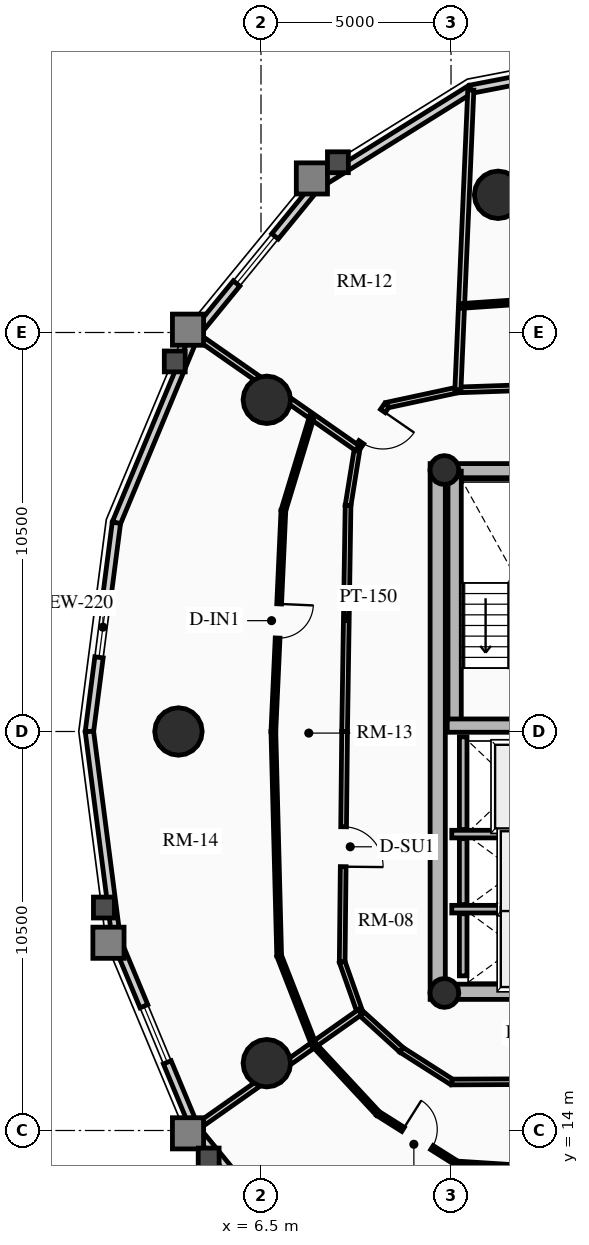
"""IFC4 building model, lengths in metres.
Left out: names, types, materials, properties, quantities, classifications, styles, units other than length and angle.
Written with IfcOpenShell. Run it as: python <this file> out.ifc"""

import sys

from ifc_helpers import new_model, si_unit, direction, frame, frame_2d, origin, origin_2d, place, context, subcontext, project, spatial, rectangle, circle, hollow_circle, extrude, source, transform, mapped, element, fill, save


model = new_model("IFC4")
c1 = context("Model", 3, precision=1e-05, world=origin(), true_north=direction((0.0, 1.0)))
c2 = subcontext(c1, "Body", "Model", "MODEL_VIEW")
j1 = project(units=[si_unit("LENGTHUNIT", "METRE"), si_unit("PLANEANGLEUNIT", "RADIAN")], contexts=[c1])
p1 = place(None, origin())
s1 = spatial("IfcSite", under=j1, at=p1, CompositionType="ELEMENT")
p2 = place(p1, origin())
s2 = spatial("IfcBuilding", under=s1, at=p2, CompositionType="ELEMENT")
p3 = place(p2, frame((0.0, 0.0, 160.33)))
s3 = spatial("IfcBuildingStorey", under=s2, at=p3, CompositionType="ELEMENT", Elevation=160.33)
p4 = place(p3, frame((11.15, 17.45, 0.0), z_axis=(0.0, 0.0, 1.0), x_axis=(0.0, 1.0, 0.0)))
e1 = element("IfcWall", 1, at=p4, inside=s3, PredefinedType="SHEAR", context=c2, shape_type="SweptSolid", body=[
    extrude(rectangle(XDim=14.1, YDim=0.4, at=frame_2d((7.05, 0.0))), origin(), (0.0, 0.0, 1.0), 2.91),
])
p5 = place(p3, frame((11.15, 17.65, 0.0), z_axis=(0.0, 0.0, 1.0), x_axis=(1.0, 0.0, 0.0)))
e2 = element("IfcWall", 2, at=p5, inside=s3, PredefinedType="SHEAR", context=c2, shape_type="SweptSolid", body=[
    extrude(rectangle(XDim=10.7, YDim=0.4, at=frame_2d((5.35, 0.0))), origin(), (0.0, 0.0, 1.0), 2.91),
])
m1 = source(origin(), c2, "Body", "SweptSolid", [
    extrude(rectangle(XDim=1.5, YDim=2.02, at=frame_2d((0.75, 1.01))), frame((0.0, 0.21, 0.0), z_axis=(0.0, -1.0, 0.0), x_axis=(1.0, 0.0, 0.0)), (0.0, 0.0, 1.0), 0.42),
])
p6 = place(p5, frame((5.45, 0.0, 0.0)))
e3 = element("IfcOpeningElement", 3, at=p6, cuts=e2, PredefinedType="OPENING", context=c2, shape_type="MappedRepresentation", body=[
    mapped(m1, transform((0.0, 0.0, 0.0), x_axis=(1.0, 0.0, 0.0), y_axis=(0.0, 1.0, 0.0), z_axis=(0.0, 0.0, 1.0), scale=1.0)),
])
p7 = place(p3, frame((11.15, 31.35, 0.0), z_axis=(0.0, 0.0, 1.0), x_axis=(1.0, 0.0, 0.0)))
e4 = element("IfcWall", 4, at=p7, inside=s3, PredefinedType="SHEAR", context=c2, shape_type="SweptSolid", body=[
    extrude(rectangle(XDim=10.7, YDim=0.4, at=frame_2d((5.35, 0.0))), origin(), (0.0, 0.0, 1.0), 2.91),
])
p8 = place(p7, frame((4.6, 0.0, 0.0)))
e5 = element("IfcOpeningElement", 5, at=p8, cuts=e4, PredefinedType="OPENING", context=c2, shape_type="MappedRepresentation", body=[
    mapped(m1, transform((0.0, 0.0, 0.0), x_axis=(1.0, 0.0, 0.0), y_axis=(0.0, 1.0, 0.0), z_axis=(0.0, 0.0, 1.0), scale=1.0)),
])
p9 = place(p3, frame((11.595, 24.655, 0.0), z_axis=(0.0, 0.0, 1.0), x_axis=(0.0, 1.0, 0.0)))
e6 = element("IfcWall", 6, at=p9, inside=s3, PredefinedType="SHEAR", context=c2, shape_type="SweptSolid", body=[
    extrude(rectangle(XDim=6.695, YDim=0.35, at=frame_2d((3.348, 0.0))), origin(), (0.0, 0.0, 1.0), 2.91),
])
p10 = place(p3, frame((11.4, 24.655, 0.0), z_axis=(0.0, 0.0, 1.0), x_axis=(1.0, 0.0, 0.0)))
e7 = element("IfcWall", 7, at=p10, inside=s3, PredefinedType="SHEAR", context=c2, shape_type="SweptSolid", body=[
    extrude(rectangle(XDim=3.285, YDim=0.35, at=frame_2d((1.643, 0.0))), origin(), (0.0, 0.0, 1.0), 2.91),
])
for number, where, z_axis, x_axis in (
    (8, (11.325, 17.62, 0.0), (0.0, 0.0, 1.0), (1.0, 0.0, 0.0)),
    (9, (11.325, 31.38, 0.0), (0.0, 0.0, 1.0), (1.0, 0.0, 0.0)),
):
    element("IfcColumn", number, at=place(p3, frame(where, z_axis=z_axis, x_axis=x_axis)), inside=s3, PredefinedType="COLUMN", context=c2, shape_type="SweptSolid", body=[
        extrude(hollow_circle(Radius=0.38, WallThickness=0.032, at=origin_2d()), origin(), (0.0, 0.0, 1.0), 2.91),
    ])
for number, where, z_axis, x_axis in (
    (10, (12.739, 38.623, 0.0), (0.0, 0.0, 1.0), (1.0, 0.0, 0.0)),
    (11, (6.653, 33.229, 0.0), (0.0, 0.0, 1.0), (1.0, 0.0, 0.0)),
    (12, (4.328, 24.5, 0.0), (0.0, 0.0, 1.0), (1.0, 0.0, 0.0)),
    (13, (6.653, 15.771, 0.0), (0.0, 0.0, 1.0), (1.0, 0.0, 0.0)),
):
    element("IfcColumn", number, at=place(p3, frame(where, z_axis=z_axis, x_axis=x_axis)), inside=s3, PredefinedType="USERDEFINED", context=c2, shape_type="SweptSolid", body=[
        extrude(circle(Radius=0.625, at=origin_2d()), origin(), (0.0, 0.0, 1.0), 2.91),
    ])
p11 = place(p3, frame((12.015, 41.4, 0.0), z_axis=(0.0, 0.0, 1.0), x_axis=(0.981718699963, 0.190337579429, 0.0)))
e14 = element("IfcWall", 14, at=p11, inside=s3, PredefinedType="SOLIDWALL", context=c2, shape_type="SweptSolid", body=[
    extrude(rectangle(XDim=4.569, YDim=0.22, at=frame_2d((2.284, 0.0))), origin(), (0.0, 0.0, 1.0), 2.245),
])
m2 = source(origin(), c2, "Body", "SweptSolid", [
    extrude(rectangle(XDim=1.6, YDim=1.3, at=frame_2d((0.8, 0.65))), frame((0.0, 0.12, 0.0), z_axis=(0.0, -1.0, 0.0), x_axis=(1.0, 0.0, 0.0)), (0.0, 0.0, 1.0), 0.24),
])
p12 = place(p11, frame((1.484, 0.0, 0.65)))
e15 = element("IfcOpeningElement", 15, at=p12, cuts=e14, PredefinedType="OPENING", context=c2, shape_type="MappedRepresentation", body=[
    mapped(m2, transform((0.0, 0.0, 0.0), x_axis=(1.0, 0.0, 0.0), y_axis=(0.0, 1.0, 0.0), z_axis=(0.0, 0.0, 1.0), scale=1.0)),
])
p13 = place(p3, frame((7.968, 38.876, 0.0), z_axis=(0.0, 0.0, 1.0), x_axis=(0.848452391194, 0.529271707044, 0.0)))
e16 = element("IfcWall", 16, at=p13, inside=s3, PredefinedType="SOLIDWALL", context=c2, shape_type="SweptSolid", body=[
    extrude(rectangle(XDim=4.769, YDim=0.22, at=frame_2d((2.385, 0.0))), origin(), (0.0, 0.0, 1.0), 2.245),
])
p14 = place(p3, frame((4.757, 34.945, 0.0), z_axis=(0.0, 0.0, 1.0), x_axis=(0.632598524901, 0.774479894053, 0.0)))
e17 = element("IfcWall", 17, at=p14, inside=s3, PredefinedType="SOLIDWALL", context=c2, shape_type="SweptSolid", body=[
    extrude(rectangle(XDim=5.076, YDim=0.22, at=frame_2d((2.538, 0.0))), origin(), (0.0, 0.0, 1.0), 2.245),
])
p15 = place(p14, frame((1.738, 0.0, 0.65)))
e18 = element("IfcOpeningElement", 18, at=p15, cuts=e17, PredefinedType="OPENING", context=c2, shape_type="MappedRepresentation", body=[
    mapped(m2, transform((0.0, 0.0, 0.0), x_axis=(1.0, 0.0, 0.0), y_axis=(0.0, 1.0, 0.0), z_axis=(0.0, 0.0, 1.0), scale=1.0)),
])
p16 = place(p3, frame((2.695, 29.991, 0.0), z_axis=(0.0, 0.0, 1.0), x_axis=(0.384259959969, 0.923224936386, 0.0)))
e19 = element("IfcWall", 19, at=p16, inside=s3, PredefinedType="SOLIDWALL", context=c2, shape_type="SweptSolid", body=[
    extrude(rectangle(XDim=5.365, YDim=0.22, at=frame_2d((2.683, 0.0))), origin(), (0.0, 0.0, 1.0), 2.245),
])
p17 = place(p3, frame((1.985, 24.5, 0.0), z_axis=(0.0, 0.0, 1.0), x_axis=(0.128266533912, 0.991739732126, 0.0)))
e20 = element("IfcWall", 20, at=p17, inside=s3, PredefinedType="SOLIDWALL", context=c2, shape_type="SweptSolid", body=[
    extrude(rectangle(XDim=5.537, YDim=0.22, at=frame_2d((2.769, 0.0))), origin(), (0.0, 0.0, 1.0), 2.245),
])
p18 = place(p17, frame((1.968, 0.0, 0.65)))
e21 = element("IfcOpeningElement", 21, at=p18, cuts=e20, PredefinedType="OPENING", context=c2, shape_type="MappedRepresentation", body=[
    mapped(m2, transform((0.0, 0.0, 0.0), x_axis=(1.0, 0.0, 0.0), y_axis=(0.0, 1.0, 0.0), z_axis=(0.0, 0.0, 1.0), scale=1.0)),
])
p19 = place(p3, frame((2.695, 19.009, 0.0), z_axis=(0.0, 0.0, 1.0), x_axis=(-0.128266533912, 0.991739732126, 0.0)))
e22 = element("IfcWall", 22, at=p19, inside=s3, PredefinedType="SOLIDWALL", context=c2, shape_type="SweptSolid", body=[
    extrude(rectangle(XDim=5.537, YDim=0.22, at=frame_2d((2.769, 0.0))), origin(), (0.0, 0.0, 1.0), 2.245),
])
p20 = place(p3, frame((4.757, 14.055, 0.0), z_axis=(0.0, 0.0, 1.0), x_axis=(-0.384259959969, 0.923224936386, 0.0)))
e23 = element("IfcWall", 23, at=p20, inside=s3, PredefinedType="SOLIDWALL", context=c2, shape_type="SweptSolid", body=[
    extrude(rectangle(XDim=5.365, YDim=0.22, at=frame_2d((2.683, 0.0))), origin(), (0.0, 0.0, 1.0), 2.245),
])
p21 = place(p20, frame((1.883, 0.0, 0.65)))
e24 = element("IfcOpeningElement", 24, at=p21, cuts=e23, PredefinedType="OPENING", context=c2, shape_type="MappedRepresentation", body=[
    mapped(m2, transform((0.0, 0.0, 0.0), x_axis=(1.0, 0.0, 0.0), y_axis=(0.0, 1.0, 0.0), z_axis=(0.0, 0.0, 1.0), scale=1.0)),
])
p22 = place(p3, frame((7.968, 10.124, 0.0), z_axis=(0.0, 0.0, 1.0), x_axis=(-0.632598524901, 0.774479894053, 0.0)))
e25 = element("IfcWall", 25, at=p22, inside=s3, PredefinedType="SOLIDWALL", context=c2, shape_type="SweptSolid", body=[
    extrude(rectangle(XDim=5.076, YDim=0.22, at=frame_2d((2.538, 0.0))), origin(), (0.0, 0.0, 1.0), 2.245),
])
p23 = place(p3, frame((11.52, 21.8, 0.0), z_axis=(0.0, 0.0, 1.0), x_axis=(1.0, 0.0, 0.0)))
e26 = element("IfcWall", 26, at=p23, inside=s3, PredefinedType="SHEAR", context=c2, shape_type="SweptSolid", body=[
    extrude(rectangle(XDim=2.97, YDim=0.2, at=frame_2d((1.485, 0.0))), origin(), (0.0, 0.0, 1.0), 2.91),
])
p24 = place(p3, frame((11.82, 21.92, 0.0), z_axis=(0.0, 0.0, 1.0), x_axis=(0.0, 1.0, 0.0)))
e27 = element("IfcWall", 27, at=p24, inside=s3, PredefinedType="SHEAR", context=c2, shape_type="SweptSolid", body=[
    extrude(rectangle(XDim=2.44, YDim=0.2, at=frame_2d((1.22, 0.0))), origin(), (0.0, 0.0, 1.0), 2.91),
])
p25 = place(p3, frame((11.52, 19.825, 0.0), z_axis=(0.0, 0.0, 1.0), x_axis=(1.0, 0.0, 0.0)))
e28 = element("IfcWall", 28, at=p25, inside=s3, PredefinedType="SHEAR", context=c2, shape_type="SweptSolid", body=[
    extrude(rectangle(XDim=2.97, YDim=0.2, at=frame_2d((1.485, 0.0))), origin(), (0.0, 0.0, 1.0), 2.91),
])
p26 = place(p3, frame((11.82, 19.945, 0.0), z_axis=(0.0, 0.0, 1.0), x_axis=(0.0, 1.0, 0.0)))
e29 = element("IfcWall", 29, at=p26, inside=s3, PredefinedType="SHEAR", context=c2, shape_type="SweptSolid", body=[
    extrude(rectangle(XDim=1.735, YDim=0.2, at=frame_2d((0.867, 0.0))), origin(), (0.0, 0.0, 1.0), 2.91),
])
p27 = place(p3, frame((11.82, 18.07, 0.0), z_axis=(0.0, 0.0, 1.0), x_axis=(0.0, 1.0, 0.0)))
e30 = element("IfcWall", 30, at=p27, inside=s3, PredefinedType="SHEAR", context=c2, shape_type="SweptSolid", body=[
    extrude(rectangle(XDim=1.635, YDim=0.2, at=frame_2d((0.817, 0.0))), origin(), (0.0, 0.0, 1.0), 2.91),
])
p28 = place(p3, frame((18.123, 33.709, 0.0), z_axis=(0.0, 0.0, 1.0), x_axis=(-0.999417459976, -0.034128297572, 0.0)))
e31 = element("IfcWall", 31, at=p28, inside=s3, PredefinedType="PARTITIONING", context=c2, shape_type="SweptSolid", body=[
    extrude(rectangle(XDim=6.445, YDim=0.15, at=frame_2d((3.223, 0.0))), origin(), (0.0, 0.0, 1.0), 2.245),
])
p29 = place(p3, frame((11.681, 33.49, 0.0), z_axis=(0.0, 0.0, 1.0), x_axis=(-0.977628265995, -0.2103401377, 0.0)))
e32 = element("IfcWall", 32, at=p29, inside=s3, PredefinedType="PARTITIONING", context=c2, shape_type="SweptSolid", body=[
    extrude(rectangle(XDim=1.912, YDim=0.15, at=frame_2d((0.956, 0.0))), origin(), (0.0, 0.0, 1.0), 2.245),
])
p30 = place(p3, frame((9.812, 33.087, 0.0), z_axis=(0.0, 0.0, 1.0), x_axis=(-0.567811958729, -0.823158295545, 0.0)))
e33 = element("IfcWall", 33, at=p30, inside=s3, PredefinedType="PARTITIONING", context=c2, shape_type="SweptSolid", body=[
    extrude(rectangle(XDim=1.372, YDim=0.15, at=frame_2d((0.686, 0.0))), origin(), (0.0, 0.0, 1.0), 2.245),
])
m3 = source(origin(), c2, "Body", "SweptSolid", [
    extrude(rectangle(XDim=1.0, YDim=2.015, at=frame_2d((0.5, 1.007))), frame((0.0, 0.085, 0.0), z_axis=(0.0, -1.0, 0.0), x_axis=(1.0, 0.0, 0.0)), (0.0, 0.0, 1.0), 0.17),
])
p31 = place(p30, frame((0.186, 0.0, 0.0)))
e34 = element("IfcOpeningElement", 34, at=p31, cuts=e33, PredefinedType="OPENING", context=c2, shape_type="MappedRepresentation", body=[
    mapped(m3, transform((0.0, 0.0, 0.0), x_axis=(1.0, 0.0, 0.0), y_axis=(0.0, 1.0, 0.0), z_axis=(0.0, 0.0, 1.0), scale=1.0)),
])
p32 = place(p3, frame((9.033, 31.958, 0.0), z_axis=(0.0, 0.0, 1.0), x_axis=(-0.158344987388, -0.98738384885, 0.0)))
e35 = element("IfcWall", 35, at=p32, inside=s3, PredefinedType="PARTITIONING", context=c2, shape_type="SweptSolid", body=[
    extrude(rectangle(XDim=1.531, YDim=0.15, at=frame_2d((0.766, 0.0))), origin(), (0.0, 0.0, 1.0), 2.245),
])
p33 = place(p3, frame((8.791, 30.446, 0.0), z_axis=(0.0, 0.0, 1.0), x_axis=(-0.015230619426, -0.999884007389, 0.0)))
e36 = element("IfcWall", 36, at=p33, inside=s3, PredefinedType="PARTITIONING", context=c2, shape_type="SweptSolid", body=[
    extrude(rectangle(XDim=5.947, YDim=0.15, at=frame_2d((2.974, 0.0))), origin(), (0.0, 0.0, 1.0), 2.675),
])
p34 = place(p3, frame((8.7, 24.5, 0.0), z_axis=(0.0, 0.0, 1.0), x_axis=(-0.010507512335, -0.999944794568, 0.0)))
e37 = element("IfcWall", 37, at=p34, inside=s3, PredefinedType="PARTITIONING", context=c2, shape_type="SweptSolid", body=[
    extrude(rectangle(XDim=6.064, YDim=0.15, at=frame_2d((3.032, 0.0))), origin(), (0.0, 0.0, 1.0), 2.245),
])
m4 = source(origin(), c2, "Body", "SweptSolid", [
    extrude(rectangle(XDim=1.05, YDim=2.015, at=frame_2d((0.525, 1.007))), frame((0.0, 0.085, 0.0), z_axis=(0.0, -1.0, 0.0), x_axis=(1.0, 0.0, 0.0)), (0.0, 0.0, 1.0), 0.17),
])
p35 = place(p34, frame((2.507, 0.0, 0.0)))
e38 = element("IfcOpeningElement", 38, at=p35, cuts=e37, PredefinedType="OPENING", context=c2, shape_type="MappedRepresentation", body=[
    mapped(m4, transform((0.0, 0.0, 0.0), x_axis=(1.0, 0.0, 0.0), y_axis=(0.0, 1.0, 0.0), z_axis=(0.0, 0.0, 1.0), scale=1.0)),
])
p36 = place(p3, frame((8.636, 18.436, 0.0), z_axis=(0.0, 0.0, 1.0), x_axis=(0.333211866524, -0.942851977782, 0.0)))
e39 = element("IfcWall", 39, at=p36, inside=s3, PredefinedType="PARTITIONING", context=c2, shape_type="SweptSolid", body=[
    extrude(rectangle(XDim=1.402, YDim=0.15, at=frame_2d((0.701, 0.0))), origin(), (0.0, 0.0, 1.0), 2.245),
])
p37 = place(p3, frame((9.103, 17.115, 0.0), z_axis=(0.0, 0.0, 1.0), x_axis=(0.740186897911, -0.672401186912, 0.0)))
e40 = element("IfcWall", 40, at=p37, inside=s3, PredefinedType="PARTITIONING", context=c2, shape_type="SweptSolid", body=[
    extrude(rectangle(XDim=1.477, YDim=0.15, at=frame_2d((0.738, 0.0))), origin(), (0.0, 0.0, 1.0), 2.245),
])
p38 = place(p3, frame((10.196, 16.122, 0.0), z_axis=(0.0, 0.0, 1.0), x_axis=(0.843021142441, -0.537880426673, 0.0)))
e41 = element("IfcWall", 41, at=p38, inside=s3, PredefinedType="PARTITIONING", context=c2, shape_type="SweptSolid", body=[
    extrude(rectangle(XDim=1.571, YDim=0.15, at=frame_2d((0.786, 0.0))), origin(), (0.0, 0.0, 1.0), 2.245),
])
p39 = place(p3, frame((11.521, 15.276, 0.0), z_axis=(0.0, 0.0, 1.0), x_axis=(0.999990688463, 0.004315436007, 0.0)))
e42 = element("IfcWall", 42, at=p39, inside=s3, PredefinedType="PARTITIONING", context=c2, shape_type="SweptSolid", body=[
    extrude(rectangle(XDim=3.281, YDim=0.15, at=frame_2d((1.641, 0.0))), origin(), (0.0, 0.0, 1.0), 2.245),
])
p40 = place(p39, frame((1.613, 0.0, 0.0)))
e43 = element("IfcOpeningElement", 43, at=p40, cuts=e42, PredefinedType="OPENING", context=c2, shape_type="MappedRepresentation", body=[
    mapped(m4, transform((0.0, 0.0, 0.0), x_axis=(1.0, 0.0, 0.0), y_axis=(0.0, 1.0, 0.0), z_axis=(0.0, 0.0, 1.0), scale=1.0)),
])
p41 = place(p3, frame((11.681, 33.49, 0.0), z_axis=(0.0, 0.0, 1.0), x_axis=(0.043022772958, 0.999074091851, 0.0)))
e44 = element("IfcWall", 44, at=p41, inside=s3, PredefinedType="PARTITIONING", context=c2, shape_type="SweptSolid", body=[
    extrude(rectangle(XDim=7.899, YDim=0.16, at=frame_2d((3.95, 0.0))), origin(), (0.0, 0.0, 1.0), 2.245),
])
p42 = place(p3, frame((9.033, 31.958, 0.0), z_axis=(0.0, 0.0, 1.0), x_axis=(-0.819840720998, 0.572591645236, 0.0)))
e45 = element("IfcWall", 45, at=p42, inside=s3, PredefinedType="PARTITIONING", context=c2, shape_type="SweptSolid", body=[
    extrude(rectangle(XDim=5.196, YDim=0.16, at=frame_2d((2.598, 0.0))), origin(), (0.0, 0.0, 1.0), 2.245),
])
p43 = place(p3, frame((9.103, 17.115, 0.0), z_axis=(0.0, 0.0, 1.0), x_axis=(-0.817760605426, -0.575558504597, 0.0)))
e46 = element("IfcWall", 46, at=p43, inside=s3, PredefinedType="PARTITIONING", context=c2, shape_type="SweptSolid", body=[
    extrude(rectangle(XDim=5.295, YDim=0.16, at=frame_2d((2.647, 0.0))), origin(), (0.0, 0.0, 1.0), 2.245),
])
p44 = place(p3, frame((17.668, 36.101, 0.0), z_axis=(0.0, 0.0, 1.0), x_axis=(-0.997685095246, -0.068003314066, 0.0)))
e47 = element("IfcWall", 47, at=p44, inside=s3, PredefinedType="PARTITIONING", context=c2, shape_type="SweptSolid", body=[
    extrude(rectangle(XDim=5.906, YDim=0.125, at=frame_2d((2.953, 0.0))), origin(), (0.0, 0.0, 1.0), 2.245),
])
p45 = place(p3, frame((7.84, 32.791, 0.0), z_axis=(0.0, 0.0, 1.0), x_axis=(-0.290387415435, -0.956909164423, 0.0)))
e48 = element("IfcWall", 48, at=p45, inside=s3, PredefinedType="PARTITIONING", context=c2, shape_type="SweptSolid", body=[
    extrude(rectangle(XDim=2.585, YDim=0.125, at=frame_2d((1.292, 0.0))), origin(), (0.0, 0.0, 1.0), 2.245),
])
p46 = place(p3, frame((7.089, 30.317, 0.0), z_axis=(0.0, 0.0, 1.0), x_axis=(-0.045322079706, -0.998972426592, 0.0)))
e49 = element("IfcWall", 49, at=p46, inside=s3, PredefinedType="PARTITIONING", context=c2, shape_type="SweptSolid", body=[
    extrude(rectangle(XDim=5.823, YDim=0.125, at=frame_2d((2.912, 0.0))), origin(), (0.0, 0.0, 1.0), 2.675),
])
m5 = source(origin(), c2, "Body", "SweptSolid", [
    extrude(rectangle(XDim=0.9, YDim=2.005, at=frame_2d((0.45, 1.002))), frame((0.0, 0.073, 0.0), z_axis=(0.0, -1.0, 0.0), x_axis=(1.0, 0.0, 0.0)), (0.0, 0.0, 1.0), 0.145),
])
p47 = place(p46, frame((2.462, 0.0, 0.0)))
e50 = element("IfcOpeningElement", 50, at=p47, cuts=e49, PredefinedType="OPENING", context=c2, shape_type="MappedRepresentation", body=[
    mapped(m5, transform((0.0, 0.0, 0.0), x_axis=(1.0, 0.0, 0.0), y_axis=(0.0, 1.0, 0.0), z_axis=(0.0, 0.0, 1.0), scale=1.0)),
])
p48 = place(p3, frame((6.825, 24.5, 0.0), z_axis=(0.0, 0.0, 1.0), x_axis=(0.025845586866, -0.999665947024, 0.0)))
e51 = element("IfcWall", 51, at=p48, inside=s3, PredefinedType="PARTITIONING", context=c2, shape_type="SweptSolid", body=[
    extrude(rectangle(XDim=5.904, YDim=0.125, at=frame_2d((2.952, 0.0))), origin(), (0.0, 0.0, 1.0), 2.245),
])
p49 = place(p3, frame((6.978, 18.598, 0.0), z_axis=(0.0, 0.0, 1.0), x_axis=(0.363845250376, -0.931459410698, 0.0)))
e52 = element("IfcWall", 52, at=p49, inside=s3, PredefinedType="PARTITIONING", context=c2, shape_type="SweptSolid", body=[
    extrude(rectangle(XDim=2.509, YDim=0.125, at=frame_2d((1.254, 0.0))), origin(), (0.0, 0.0, 1.0), 2.245),
])
p50 = place(p3, frame((7.891, 16.261, 0.0), z_axis=(0.0, 0.0, 1.0), x_axis=(0.680443535441, -0.7328005152, 0.0)))
e53 = element("IfcWall", 53, at=p50, inside=s3, PredefinedType="PARTITIONING", context=c2, shape_type="SweptSolid", body=[
    extrude(rectangle(XDim=2.476, YDim=0.125, at=frame_2d((1.238, 0.0))), origin(), (0.0, 0.0, 1.0), 2.245),
])
p51 = place(p3, frame((9.576, 14.447, 0.0), z_axis=(0.0, 0.0, 1.0), x_axis=(0.845905204383, -0.53333327779, 0.0)))
e54 = element("IfcWall", 54, at=p51, inside=s3, PredefinedType="PARTITIONING", context=c2, shape_type="SweptSolid", body=[
    extrude(rectangle(XDim=2.465, YDim=0.125, at=frame_2d((1.232, 0.0))), origin(), (0.0, 0.0, 1.0), 2.245),
])
p52 = place(p51, frame((0.782, 0.0, 0.0)))
e55 = element("IfcOpeningElement", 55, at=p52, cuts=e54, PredefinedType="OPENING", context=c2, shape_type="MappedRepresentation", body=[
    mapped(m5, transform((0.0, 0.0, 0.0), x_axis=(1.0, 0.0, 0.0), y_axis=(0.0, 1.0, 0.0), z_axis=(0.0, 0.0, 1.0), scale=1.0)),
])
p53 = place(p3, frame((11.661, 13.132, 0.0), z_axis=(0.0, 0.0, 1.0), x_axis=(0.997932841329, -0.064265419915, 0.0)))
e56 = element("IfcWall", 56, at=p53, inside=s3, PredefinedType="PARTITIONING", context=c2, shape_type="SweptSolid", body=[
    extrude(rectangle(XDim=3.624, YDim=0.125, at=frame_2d((1.812, 0.0))), origin(), (0.0, 0.0, 1.0), 2.245),
])
m6 = source(origin(), c2, "Body", "SweptSolid", [
    extrude(rectangle(XDim=1.6, YDim=1.3, at=frame_2d((0.8, 0.65))), frame((0.0, 0.03, 0.0), z_axis=(0.0, -1.0, 0.0), x_axis=(1.0, 0.0, 0.0)), (0.0, 0.0, 1.0), 0.06),
])
p54 = place(p15, origin())
e57 = element("IfcWindow", 57, at=p54, inside=s3, PartitioningType="SINGLE_PANEL", PredefinedType="WINDOW", context=c2, shape_type="MappedRepresentation", body=[
    mapped(m6, transform((0.0, 0.0, 0.0), x_axis=(1.0, 0.0, 0.0), y_axis=(0.0, 1.0, 0.0), z_axis=(0.0, 0.0, 1.0), scale=1.0)),
])
fill(e18, e57)
p55 = place(p18, origin())
e58 = element("IfcWindow", 58, at=p55, inside=s3, PartitioningType="SINGLE_PANEL", PredefinedType="WINDOW", context=c2, shape_type="MappedRepresentation", body=[
    mapped(m6, transform((0.0, 0.0, 0.0), x_axis=(1.0, 0.0, 0.0), y_axis=(0.0, 1.0, 0.0), z_axis=(0.0, 0.0, 1.0), scale=1.0)),
])
fill(e21, e58)
p56 = place(p21, origin())
e59 = element("IfcWindow", 59, at=p56, inside=s3, PartitioningType="SINGLE_PANEL", PredefinedType="WINDOW", context=c2, shape_type="MappedRepresentation", body=[
    mapped(m6, transform((0.0, 0.0, 0.0), x_axis=(1.0, 0.0, 0.0), y_axis=(0.0, 1.0, 0.0), z_axis=(0.0, 0.0, 1.0), scale=1.0)),
])
fill(e24, e59)
m7 = source(origin(), c2, "Body", "SweptSolid", [
    extrude(rectangle(XDim=1.0, YDim=2.015, at=frame_2d((0.5, 1.007))), frame((0.0, 0.025, 0.0), z_axis=(0.0, -1.0, 0.0), x_axis=(1.0, 0.0, 0.0)), (0.0, 0.0, 1.0), 0.05),
])
p57 = place(p31, origin())
e60 = element("IfcDoor", 60, at=p57, inside=s3, OperationType="SINGLE_SWING_LEFT", PredefinedType="DOOR", context=c2, shape_type="MappedRepresentation", body=[
    mapped(m7, transform((0.0, 0.0, 0.0), x_axis=(1.0, 0.0, 0.0), y_axis=(0.0, 1.0, 0.0), z_axis=(0.0, 0.0, 1.0), scale=1.0)),
])
fill(e34, e60)
m8 = source(origin(), c2, "Body", "SweptSolid", [
    extrude(rectangle(XDim=1.05, YDim=2.015, at=frame_2d((0.525, 1.007))), frame((0.0, 0.025, 0.0), z_axis=(0.0, -1.0, 0.0), x_axis=(1.0, 0.0, 0.0)), (0.0, 0.0, 1.0), 0.05),
])
p58 = place(p35, origin())
e61 = element("IfcDoor", 61, at=p58, inside=s3, OperationType="SINGLE_SWING_RIGHT", PredefinedType="DOOR", context=c2, shape_type="MappedRepresentation", body=[
    mapped(m8, transform((0.0, 0.0, 0.0), x_axis=(1.0, 0.0, 0.0), y_axis=(0.0, 1.0, 0.0), z_axis=(0.0, 0.0, 1.0), scale=1.0)),
])
fill(e38, e61)
m9 = source(origin(), c2, "Body", "SweptSolid", [
    extrude(rectangle(XDim=0.9, YDim=2.005, at=frame_2d((0.45, 1.002))), frame((0.0, 0.025, 0.0), z_axis=(0.0, -1.0, 0.0), x_axis=(1.0, 0.0, 0.0)), (0.0, 0.0, 1.0), 0.05),
])
p59 = place(p47, origin())
e62 = element("IfcDoor", 62, at=p59, inside=s3, OperationType="SINGLE_SWING_LEFT", PredefinedType="DOOR", context=c2, shape_type="MappedRepresentation", body=[
    mapped(m9, transform((0.0, 0.0, 0.0), x_axis=(1.0, 0.0, 0.0), y_axis=(0.0, 1.0, 0.0), z_axis=(0.0, 0.0, 1.0), scale=1.0)),
])
fill(e50, e62)
p60 = place(p52, origin())
e63 = element("IfcDoor", 63, at=p60, inside=s3, OperationType="SINGLE_SWING_LEFT", PredefinedType="DOOR", context=c2, shape_type="MappedRepresentation", body=[
    mapped(m9, transform((0.0, 0.0, 0.0), x_axis=(1.0, 0.0, 0.0), y_axis=(0.0, 1.0, 0.0), z_axis=(0.0, 0.0, 1.0), scale=1.0)),
])
fill(e55, e63)
save(model, sys.argv[1])
